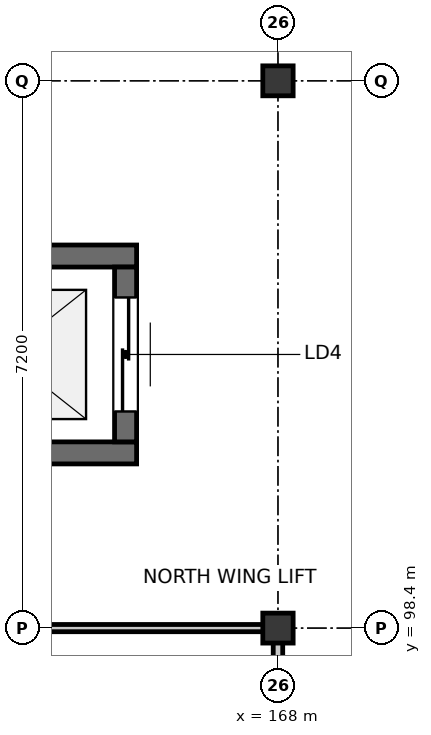
"""IFC4 building model, lengths in metres.
Left out: names, types, materials, properties, quantities, classifications, styles, units other than length and angle.
Written with IfcOpenShell. Run it as: python <this file> out.ifc"""

import sys

from ifc_helpers import new_model, si_unit, direction, frame, frame_2d, origin, origin_2d, place, context, subcontext, project, spatial, rectangle, i_section, extrude, element, fill, save


model = new_model("IFC4")
c1 = context("Model", 3, precision=1e-05, world=origin(), true_north=direction((0.0, 1.0)))
c2 = subcontext(c1, "Body", "Model", "MODEL_VIEW")
j1 = project(units=[si_unit("LENGTHUNIT", "METRE"), si_unit("PLANEANGLEUNIT", "RADIAN")], contexts=[c1])
p1 = place(None, origin())
s1 = spatial("IfcSite", under=j1, at=p1, CompositionType="ELEMENT")
p2 = place(p1, origin())
s2 = spatial("IfcBuilding", under=s1, at=p2, CompositionType="ELEMENT")
p3 = place(p2, frame((0.0, 0.0, -4.5)))
s3 = spatial("IfcBuildingStorey", under=s2, at=p3, CompositionType="ELEMENT", Elevation=-4.5)
for number, where, z_axis, x_axis in (
    (1, (168.0, 98.4, 0.0), (0.0, 0.0, 1.0), (1.0, 0.0, 0.0)),
    (2, (168.0, 105.6, 0.0), (0.0, 0.0, 1.0), (1.0, 0.0, 0.0)),
):
    element("IfcColumn", number, at=place(p3, frame(where, z_axis=z_axis, x_axis=x_axis)), inside=s3, PredefinedType="COLUMN", context=c2, shape_type="SweptSolid", body=[
        extrude(i_section(OverallWidth=0.399, OverallDepth=0.394, WebThickness=0.023, FlangeThickness=0.037, FilletRadius=0.015, at=origin_2d()), origin(), (0.0, 0.0, 1.0), 4.5),
    ])
for number, where, z_axis, x_axis in (
    (3, (166.14, 100.705, 0.0), (0.0, 0.0, 1.0), (-1.0, 0.0, 0.0)),
    (4, (162.66, 103.295, 0.0), (0.0, 0.0, 1.0), (1.0, 0.0, 0.0)),
):
    element("IfcWall", number, at=place(p3, frame(where, z_axis=z_axis, x_axis=x_axis)), inside=s3, PredefinedType="SHEAR", context=c2, shape_type="SweptSolid", body=[
        extrude(rectangle(XDim=3.48, YDim=0.29, at=frame_2d((1.74, 0.0))), origin(), (0.0, 0.0, 1.0), 4.18),
    ])
p4 = place(p3, frame((165.995, 103.15, 0.0), z_axis=(0.0, 0.0, 1.0), x_axis=(0.0, -1.0, 0.0)))
e5 = element("IfcWall", 5, at=p4, inside=s3, PredefinedType="SHEAR", context=c2, shape_type="SweptSolid", body=[
    extrude(rectangle(XDim=2.3, YDim=0.29, at=frame_2d((1.15, 0.0))), origin(), (0.0, 0.0, 1.0), 4.18),
])
p5 = place(p4, frame((0.4, 0.0, 0.0)))
e6 = element("IfcOpeningElement", 6, at=p5, cuts=e5, PredefinedType="OPENING", context=c2, shape_type="SweptSolid", body=[
    extrude(rectangle(XDim=1.5, YDim=2.3, at=frame_2d((0.75, 1.15))), frame((0.0, 0.155, 0.0), z_axis=(0.0, -1.0, 0.0), x_axis=(1.0, 0.0, 0.0)), (0.0, 0.0, 1.0), 0.31),
])
p6 = place(p3, frame((153.52, 98.4, 0.0), z_axis=(0.0, 0.0, 1.0), x_axis=(1.0, 0.0, 0.0)))
e7 = element("IfcWall", 7, at=p6, inside=s3, PredefinedType="PARTITIONING", context=c2, shape_type="SweptSolid", body=[
    extrude(rectangle(XDim=14.56, YDim=0.095, at=frame_2d((7.28, 0.0))), origin(), (0.0, 0.0, 1.0), 3.403),
])
p7 = place(p3, frame((168.0, 98.351, 0.0), z_axis=(0.0, 0.0, 1.0), x_axis=(0.0, -1.0, 0.0)))
e8 = element("IfcWall", 8, at=p7, inside=s3, PredefinedType="PARTITIONING", context=c2, shape_type="SweptSolid", body=[
    extrude(rectangle(XDim=21.414, YDim=0.125, at=frame_2d((10.707, 0.0))), origin(), (0.0, 0.0, 1.0), 3.403),
])
p8 = place(p7, frame((10.017, 0.0, 0.0)))
e9 = element("IfcOpeningElement", 9, at=p8, cuts=e8, PredefinedType="OPENING", context=c2, shape_type="SweptSolid", body=[
    extrude(rectangle(XDim=1.38, YDim=2.1, at=frame_2d((0.69, 1.05))), frame((0.0, 0.073, 0.0), z_axis=(0.0, -1.0, 0.0), x_axis=(1.0, 0.0, 0.0)), (0.0, 0.0, 1.0), 0.145),
])
p9 = place(p5, origin())
e10 = element("IfcDoor", 10, at=p9, inside=s3, OperationType="DOUBLE_DOOR_SLIDING", PredefinedType="DOOR", context=c2, shape_type="SweptSolid", body=[
    extrude(rectangle(XDim=1.5, YDim=2.3, at=frame_2d((0.75, 1.15))), frame((0.0, 0.025, 0.0), z_axis=(0.0, -1.0, 0.0), x_axis=(1.0, 0.0, 0.0)), (0.0, 0.0, 1.0), 0.05),
])
fill(e6, e10)
save(model, sys.argv[1])
